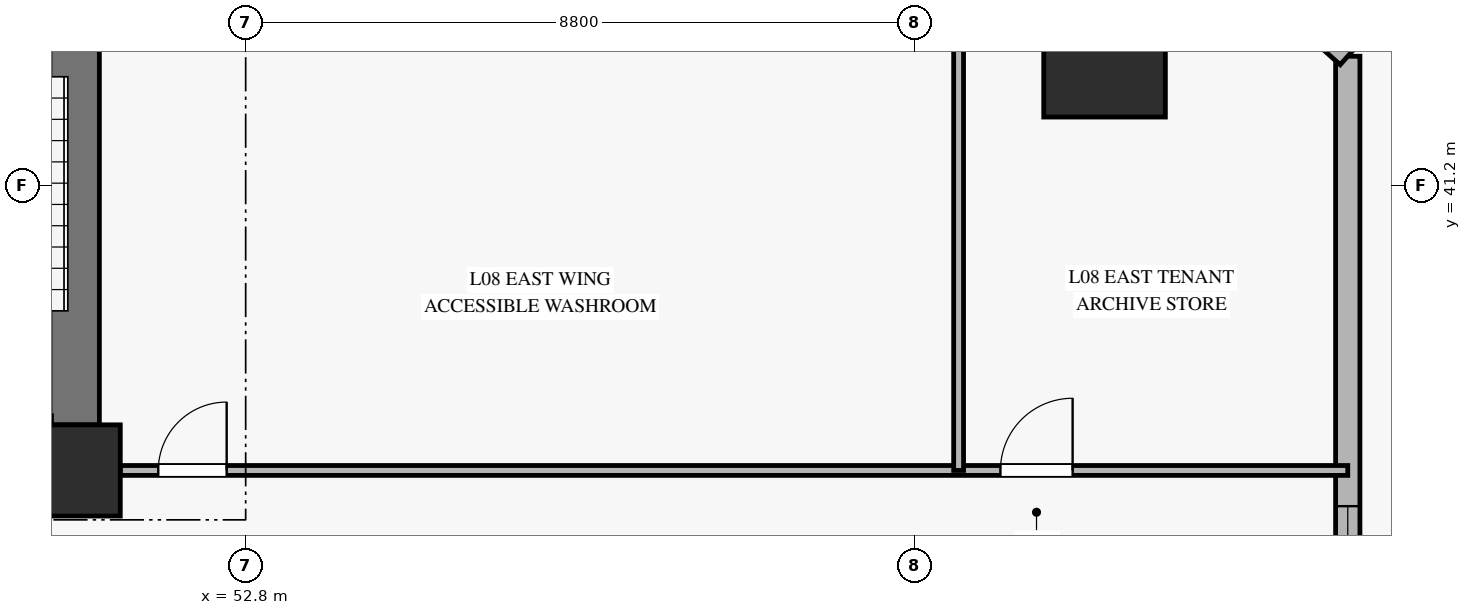
"""IFC4 building model, lengths in metres.
Left out: names, types, materials, properties, quantities, classifications, styles, units other than length and angle.
Written with IfcOpenShell. Run it as: python <this file> out.ifc"""

import sys

from ifc_helpers import new_model, si_unit, direction, frame, frame_2d, origin, origin_2d, place, context, subcontext, project, spatial, rectangle, hollow_rectangle, extrude, source, transform, mapped, element, fill, save


model = new_model("IFC4")
c1 = context("Model", 3, precision=1e-05, world=origin(), true_north=direction((0.0, 1.0)))
c2 = subcontext(c1, "Body", "Model", "MODEL_VIEW")
j1 = project(units=[si_unit("LENGTHUNIT", "METRE"), si_unit("PLANEANGLEUNIT", "RADIAN")], contexts=[c1])
p1 = place(None, origin())
s1 = spatial("IfcSite", under=j1, at=p1, CompositionType="ELEMENT")
p2 = place(p1, origin())
s2 = spatial("IfcBuilding", under=s1, at=p2, CompositionType="ELEMENT")
p3 = place(p2, frame((0.0, 0.0, 33.2)))
s3 = spatial("IfcBuildingStorey", under=s2, at=p3, CompositionType="ELEMENT", Elevation=33.2)
m1 = source(origin(), c2, "Body", "SweptSolid", [
    extrude(rectangle(XDim=1.2, YDim=1.2, at=origin_2d()), origin(), (0.0, 0.0, 1.0), 3.68),
])
p4 = place(p3, frame((50.55, 37.45, 0.0), z_axis=(0.0, 0.0, 1.0), x_axis=(1.0, 0.0, 0.0)))
e1 = element("IfcColumn", 1, at=p4, inside=s3, PredefinedType="PILASTER", context=c2, shape_type="MappedRepresentation", body=[
    mapped(m1, transform((0.0, 0.0, 0.0), x_axis=(1.0, 0.0, 0.0), y_axis=(0.0, 1.0, 0.0), z_axis=(0.0, 0.0, 1.0), scale=1.0)),
])
p5 = place(p3, frame((50.55, 38.05, 0.0), z_axis=(0.0, 0.0, 1.0), x_axis=(0.0, 1.0, 0.0)))
e2 = element("IfcWall", 2, at=p5, inside=s3, PredefinedType="SHEAR", context=c2, shape_type="SweptSolid", body=[
    extrude(rectangle(XDim=7.9, YDim=0.65, at=frame_2d((3.95, 0.0))), origin(), (0.0, 0.0, 1.0), 3.68),
])
m2 = source(origin(), c2, "Body", "SweptSolid", [
    extrude(hollow_rectangle(XDim=1.6, YDim=1.6, WallThickness=0.075, at=origin_2d()), origin(), (0.0, 0.0, 1.0), 3.686),
])
p6 = place(p3, frame((64.1, 42.9, 0.0), z_axis=(-0.056697506007, 0.007087188251, 0.998366247714), x_axis=(-0.124034734589, -0.992277876714, 0.0)))
e3 = element("IfcColumn", 3, at=p6, inside=s3, PredefinedType="COLUMN", context=c2, shape_type="MappedRepresentation", body=[
    mapped(m2, transform((0.0, 0.0, 0.0), x_axis=(1.0, 0.0, 0.0), y_axis=(0.0, 1.0, 0.0), z_axis=(0.0, 0.0, 1.0), scale=1.0)),
])
p7 = place(p3, frame((67.3, 25.25, 0.0), z_axis=(0.0, 0.0, 1.0), x_axis=(0.0, 1.0, 0.0)))
e4 = element("IfcWall", 4, at=p7, inside=s3, PredefinedType="SOLIDWALL", context=c2, shape_type="SweptSolid", body=[
    extrude(rectangle(XDim=17.65, YDim=0.32, at=frame_2d((8.825, 0.0))), origin(), (0.0, 0.0, 1.0), 3.16),
])
p8 = place(p7, frame((10.13, 0.0, 0.45)))
e5 = element("IfcOpeningElement", 5, at=p8, cuts=e4, PredefinedType="OPENING", context=c2, shape_type="SweptSolid", body=[
    extrude(rectangle(XDim=1.6, YDim=2.0, at=frame_2d((0.8, 1.0))), frame((0.0, 0.17, 0.0), z_axis=(0.0, -1.0, 0.0), x_axis=(1.0, 0.0, 0.0)), (0.0, 0.0, 1.0), 0.34),
])
p9 = place(p3, frame((67.3, 42.9, 0.0), z_axis=(0.0, 0.0, 1.0), x_axis=(-0.745751558502, 0.666224146209, 0.0)))
e6 = element("IfcWall", 6, at=p9, inside=s3, PredefinedType="SOLIDWALL", context=c2, shape_type="SweptSolid", body=[
    extrude(rectangle(XDim=5.029, YDim=0.3, at=frame_2d((2.514, 0.0))), origin(), (0.0, 0.0, 1.0), 3.16),
])
p10 = place(p9, frame((1.714, 0.0, 0.45)))
e7 = element("IfcOpeningElement", 7, at=p10, cuts=e6, PredefinedType="OPENING", context=c2, shape_type="SweptSolid", body=[
    extrude(rectangle(XDim=1.6, YDim=2.0, at=frame_2d((0.8, 1.0))), frame((0.0, 0.16, 0.0), z_axis=(0.0, -1.0, 0.0), x_axis=(1.0, 0.0, 0.0)), (0.0, 0.0, 1.0), 0.32),
])
p11 = place(p3, frame((51.15, 37.45, 0.0), z_axis=(0.0, 0.0, 1.0), x_axis=(1.0, 0.0, 0.0)))
e8 = element("IfcWall", 8, at=p11, inside=s3, PredefinedType="PARTITIONING", context=c2, shape_type="SweptSolid", body=[
    extrude(rectangle(XDim=16.15, YDim=0.13, at=frame_2d((8.075, 0.0))), origin(), (0.0, 0.0, 1.0), 3.165),
])
p12 = place(p11, frame((0.5, 0.0, 0.0)))
e9 = element("IfcOpeningElement", 9, at=p12, cuts=e8, PredefinedType="OPENING", context=c2, shape_type="SweptSolid", body=[
    extrude(rectangle(XDim=0.9, YDim=2.1, at=frame_2d((0.45, 1.05))), frame((0.0, 0.075, 0.0), z_axis=(0.0, -1.0, 0.0), x_axis=(1.0, 0.0, 0.0)), (0.0, 0.0, 1.0), 0.15),
])
p13 = place(p11, frame((11.58, 0.0, 0.0)))
e10 = element("IfcOpeningElement", 10, at=p13, cuts=e8, PredefinedType="OPENING", context=c2, shape_type="SweptSolid", body=[
    extrude(rectangle(XDim=0.95, YDim=2.1, at=frame_2d((0.475, 1.05))), frame((0.0, 0.075, 0.0), z_axis=(0.0, -1.0, 0.0), x_axis=(1.0, 0.0, 0.0)), (0.0, 0.0, 1.0), 0.15),
])
p14 = place(p3, frame((62.18, 37.45, 0.0), z_axis=(0.0, 0.0, 1.0), x_axis=(0.0, 1.0, 0.0)))
e11 = element("IfcWall", 11, at=p14, inside=s3, PredefinedType="PARTITIONING", context=c2, shape_type="SweptSolid", body=[
    extrude(rectangle(XDim=8.8, YDim=0.13, at=frame_2d((4.4, 0.0))), origin(), (0.0, 0.0, 1.0), 3.68),
])
m3 = source(origin(), c2, "Body", "SweptSolid", [
    extrude(rectangle(XDim=1.6, YDim=2.0, at=frame_2d((0.8, 1.0))), frame((0.0, 0.03, 0.0), z_axis=(0.0, -1.0, 0.0), x_axis=(1.0, 0.0, 0.0)), (0.0, 0.0, 1.0), 0.06),
])
p15 = place(p8, origin())
e12 = element("IfcWindow", 12, at=p15, inside=s3, PartitioningType="SINGLE_PANEL", PredefinedType="WINDOW", context=c2, shape_type="MappedRepresentation", body=[
    mapped(m3, transform((0.0, 0.0, 0.0), x_axis=(1.0, 0.0, 0.0), y_axis=(0.0, 1.0, 0.0), z_axis=(0.0, 0.0, 1.0), scale=1.0)),
])
fill(e5, e12)
m4 = source(origin(), c2, "Body", "SweptSolid", [
    extrude(rectangle(XDim=0.9, YDim=2.1, at=frame_2d((0.45, 1.05))), frame((0.0, 0.025, 0.0), z_axis=(0.0, -1.0, 0.0), x_axis=(1.0, 0.0, 0.0)), (0.0, 0.0, 1.0), 0.05),
])
p16 = place(p12, origin())
e13 = element("IfcDoor", 13, at=p16, inside=s3, OperationType="SINGLE_SWING_RIGHT", PredefinedType="DOOR", context=c2, shape_type="MappedRepresentation", body=[
    mapped(m4, transform((0.0, 0.0, 0.0), x_axis=(1.0, 0.0, 0.0), y_axis=(0.0, 1.0, 0.0), z_axis=(0.0, 0.0, 1.0), scale=1.0)),
])
fill(e9, e13)
m5 = source(origin(), c2, "Body", "SweptSolid", [
    extrude(rectangle(XDim=0.95, YDim=2.1, at=frame_2d((0.475, 1.05))), frame((0.0, 0.025, 0.0), z_axis=(0.0, -1.0, 0.0), x_axis=(1.0, 0.0, 0.0)), (0.0, 0.0, 1.0), 0.05),
])
p17 = place(p13, origin())
e14 = element("IfcDoor", 14, at=p17, inside=s3, OperationType="SINGLE_SWING_RIGHT", PredefinedType="DOOR", context=c2, shape_type="MappedRepresentation", body=[
    mapped(m5, transform((0.0, 0.0, 0.0), x_axis=(1.0, 0.0, 0.0), y_axis=(0.0, 1.0, 0.0), z_axis=(0.0, 0.0, 1.0), scale=1.0)),
])
fill(e10, e14)
save(model, sys.argv[1])
